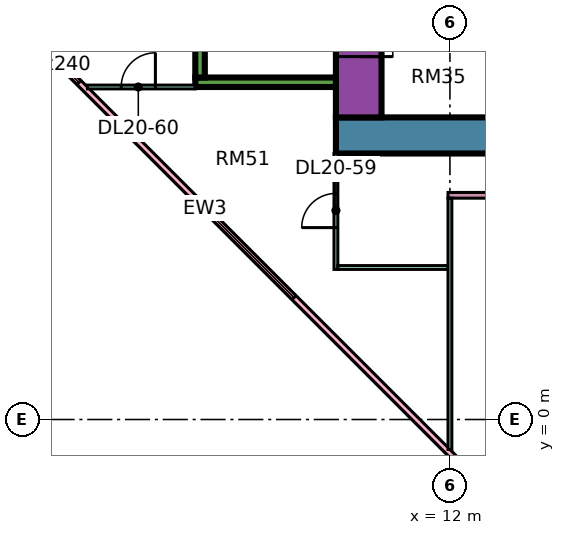
"""IFC4 building model, lengths in metres.
Left out: names, types, materials, properties, quantities, classifications, styles, units other than length and angle.
Written with IfcOpenShell. Run it as: python <this file> out.ifc"""

import sys

from ifc_helpers import new_model, si_unit, direction, frame, frame_2d, origin, place, context, subcontext, project, spatial, rectangle, extrude, element, fill, save


model = new_model("IFC4")
c1 = context("Model", 3, precision=1e-05, world=origin(), true_north=direction((0.0, 1.0)))
c2 = subcontext(c1, "Body", "Model", "MODEL_VIEW")
j1 = project(units=[si_unit("LENGTHUNIT", "METRE"), si_unit("PLANEANGLEUNIT", "RADIAN")], contexts=[c1])
p1 = place(None, origin())
s1 = spatial("IfcSite", under=j1, at=p1, CompositionType="ELEMENT")
p2 = place(p1, origin())
s2 = spatial("IfcBuilding", under=s1, at=p2, CompositionType="ELEMENT")
p3 = place(p2, frame((0.0, 0.0, 91.9)))
s3 = spatial("IfcBuildingStorey", under=s2, at=p3, CompositionType="ELEMENT", Elevation=91.9)
p4 = place(p3, frame((9.0, 7.475, 0.0), z_axis=(0.0, 0.0, 1.0), x_axis=(1.0, 0.0, 0.0)))
e1 = element("IfcWall", 1, at=p4, inside=s3, PredefinedType="SHEAR", context=c2, shape_type="SweptSolid", body=[
    extrude(rectangle(XDim=25.0, YDim=0.95, at=frame_2d((12.5, 0.0))), origin(), (0.0, 0.0, 1.0), 3.75),
])
p5 = place(p3, frame((9.6, 7.95, 0.0), z_axis=(0.0, 0.0, 1.0), x_axis=(0.0, 1.0, 0.0)))
e2 = element("IfcWall", 2, at=p5, inside=s3, PredefinedType="SHEAR", context=c2, shape_type="SweptSolid", body=[
    extrude(rectangle(XDim=11.1, YDim=1.2, at=frame_2d((5.55, 0.0))), origin(), (0.0, 0.0, 1.0), 3.75),
])
p6 = place(p5, frame((3.925, 0.0, 0.0)))
e3 = element("IfcOpeningElement", 3, at=p6, cuts=e2, PredefinedType="OPENING", context=c2, shape_type="SweptSolid", body=[
    extrude(rectangle(XDim=1.1, YDim=2.2, at=frame_2d((0.55, 1.1))), frame((0.0, 0.61, 0.0), z_axis=(0.0, -1.0, 0.0), x_axis=(1.0, 0.0, 0.0)), (0.0, 0.0, 1.0), 1.22),
])
p7 = place(p5, frame((6.425, 0.0, 0.0)))
e4 = element("IfcOpeningElement", 4, at=p7, cuts=e2, PredefinedType="OPENING", context=c2, shape_type="SweptSolid", body=[
    extrude(rectangle(XDim=1.1, YDim=2.2, at=frame_2d((0.55, 1.1))), frame((0.0, 0.61, 0.0), z_axis=(0.0, -1.0, 0.0), x_axis=(1.0, 0.0, 0.0)), (0.0, 0.0, 1.0), 1.22),
])
p8 = place(p5, frame((9.175, 0.0, 0.0)))
e5 = element("IfcOpeningElement", 5, at=p8, cuts=e2, PredefinedType="OPENING", context=c2, shape_type="SweptSolid", body=[
    extrude(rectangle(XDim=1.1, YDim=2.2, at=frame_2d((0.55, 1.1))), frame((0.0, 0.61, 0.0), z_axis=(0.0, -1.0, 0.0), x_axis=(1.0, 0.0, 0.0)), (0.0, 0.0, 1.0), 1.22),
])
p9 = place(p5, frame((1.6, 0.0, 0.0)))
e6 = element("IfcOpeningElement", 6, at=p9, cuts=e2, PredefinedType="OPENING", context=c2, shape_type="SweptSolid", body=[
    extrude(rectangle(XDim=0.9, YDim=2.1, at=frame_2d((0.45, 1.05))), frame((0.0, 0.61, 0.0), z_axis=(0.0, -1.0, 0.0), x_axis=(1.0, 0.0, 0.0)), (0.0, 0.0, 1.0), 1.22),
])
p10 = place(p3, frame((5.3, 8.875, 0.0), z_axis=(0.0, 0.0, 1.0), x_axis=(1.0, 0.0, 0.0)))
e7 = element("IfcWall", 7, at=p10, inside=s3, PredefinedType="SHEAR", context=c2, shape_type="SweptSolid", body=[
    extrude(rectangle(XDim=3.7, YDim=0.25, at=frame_2d((1.85, 0.0))), origin(), (0.0, 0.0, 1.0), 3.75),
])
p11 = place(p3, frame((5.425, 9.0, 0.0), z_axis=(0.0, 0.0, 1.0), x_axis=(0.0, 1.0, 0.0)))
e8 = element("IfcWall", 8, at=p11, inside=s3, PredefinedType="SHEAR", context=c2, shape_type="SweptSolid", body=[
    extrude(rectangle(XDim=4.0, YDim=0.25, at=frame_2d((2.0, 0.0))), origin(), (0.0, 0.0, 1.0), 3.75),
])
p12 = place(p3, frame((-1.447, 12.553, 0.0), z_axis=(0.0, 0.0, 1.0), x_axis=(0.707106781187, -0.707106781187, 0.0)))
e9 = element("IfcWall", 9, at=p12, inside=s3, PredefinedType="SOLIDWALL", context=c2, shape_type="SweptSolid", body=[
    extrude(rectangle(XDim=19.799, YDim=0.15, at=frame_2d((9.899, 0.0))), origin(), (0.0, 0.0, 1.0), 3.35),
])
p13 = place(p12, frame((2.212, 0.0, 0.45)))
e10 = element("IfcOpeningElement", 10, at=p13, cuts=e9, PredefinedType="OPENING", context=c2, shape_type="SweptSolid", body=[
    extrude(rectangle(XDim=3.0, YDim=2.4, at=frame_2d((1.5, 1.2))), frame((0.0, 0.085, 0.0), z_axis=(0.0, -1.0, 0.0), x_axis=(1.0, 0.0, 0.0)), (0.0, 0.0, 1.0), 0.17),
])
p14 = place(p12, frame((10.216, 0.0, 0.45)))
e11 = element("IfcOpeningElement", 11, at=p14, cuts=e9, PredefinedType="OPENING", context=c2, shape_type="SweptSolid", body=[
    extrude(rectangle(XDim=3.0, YDim=2.4, at=frame_2d((1.5, 1.2))), frame((0.0, 0.085, 0.0), z_axis=(0.0, -1.0, 0.0), x_axis=(1.0, 0.0, 0.0)), (0.0, 0.0, 1.0), 0.17),
])
p15 = place(p3, frame((2.461, 8.75, 0.0), z_axis=(0.0, 0.0, 1.0), x_axis=(1.0, 0.0, 0.0)))
e12 = element("IfcWall", 12, at=p15, inside=s3, PredefinedType="PARTITIONING", context=c2, shape_type="SweptSolid", body=[
    extrude(rectangle(XDim=2.839, YDim=0.1, at=frame_2d((1.419, 0.0))), origin(), (0.0, 0.0, 1.0), 3.35),
])
p16 = place(p15, frame((0.889, 0.0, 0.0)))
e13 = element("IfcOpeningElement", 13, at=p16, cuts=e12, PredefinedType="OPENING", context=c2, shape_type="SweptSolid", body=[
    extrude(rectangle(XDim=0.9, YDim=2.1, at=frame_2d((0.45, 1.05))), frame((0.0, 0.06, 0.0), z_axis=(0.0, -1.0, 0.0), x_axis=(1.0, 0.0, 0.0)), (0.0, 0.0, 1.0), 0.12),
])
p17 = place(p3, frame((9.0, 3.95, 0.0), z_axis=(0.0, 0.0, 1.0), x_axis=(0.0, 1.0, 0.0)))
e14 = element("IfcWall", 14, at=p17, inside=s3, PredefinedType="PARTITIONING", context=c2, shape_type="SweptSolid", body=[
    extrude(rectangle(XDim=3.05, YDim=0.1, at=frame_2d((1.525, 0.0))), origin(), (0.0, 0.0, 1.0), 3.35),
])
p18 = place(p17, frame((1.1, 0.0, 0.0)))
e15 = element("IfcOpeningElement", 15, at=p18, cuts=e14, PredefinedType="OPENING", context=c2, shape_type="SweptSolid", body=[
    extrude(rectangle(XDim=0.9, YDim=2.1, at=frame_2d((0.45, 1.05))), frame((0.0, 0.06, 0.0), z_axis=(0.0, -1.0, 0.0), x_axis=(1.0, 0.0, 0.0)), (0.0, 0.0, 1.0), 0.12),
])
p19 = place(p3, frame((9.05, 4.0, 0.0), z_axis=(0.0, 0.0, 1.0), x_axis=(1.0, 0.0, 0.0)))
e16 = element("IfcWall", 16, at=p19, inside=s3, PredefinedType="PARTITIONING", context=c2, shape_type="SweptSolid", body=[
    extrude(rectangle(XDim=2.9, YDim=0.1, at=frame_2d((1.45, 0.0))), origin(), (0.0, 0.0, 1.0), 3.35),
])
p20 = place(p3, frame((11.95, 5.9, 0.0), z_axis=(0.0, 0.0, 1.0), x_axis=(1.0, 0.0, 0.0)))
e17 = element("IfcWall", 17, at=p20, inside=s3, PredefinedType="PARTITIONING", context=c2, shape_type="SweptSolid", body=[
    extrude(rectangle(XDim=21.1, YDim=0.15, at=frame_2d((10.55, 0.0))), origin(), (0.0, 0.0, 1.0), 3.35),
])
p21 = place(p20, frame((10.1, 0.0, 0.0)))
e18 = element("IfcOpeningElement", 18, at=p21, cuts=e17, PredefinedType="OPENING", context=c2, shape_type="SweptSolid", body=[
    extrude(rectangle(XDim=0.9, YDim=2.1, at=frame_2d((0.45, 1.05))), frame((0.0, 0.085, 0.0), z_axis=(0.0, -1.0, 0.0), x_axis=(1.0, 0.0, 0.0)), (0.0, 0.0, 1.0), 0.17),
])
p22 = place(p20, frame((16.1, 0.0, 0.0)))
e19 = element("IfcOpeningElement", 19, at=p22, cuts=e17, PredefinedType="OPENING", context=c2, shape_type="SweptSolid", body=[
    extrude(rectangle(XDim=0.9, YDim=2.1, at=frame_2d((0.45, 1.05))), frame((0.0, 0.085, 0.0), z_axis=(0.0, -1.0, 0.0), x_axis=(1.0, 0.0, 0.0)), (0.0, 0.0, 1.0), 0.17),
])
p23 = place(p20, frame((4.1, 0.0, 0.0)))
e20 = element("IfcOpeningElement", 20, at=p23, cuts=e17, PredefinedType="OPENING", context=c2, shape_type="SweptSolid", body=[
    extrude(rectangle(XDim=0.9, YDim=2.1, at=frame_2d((0.45, 1.05))), frame((0.0, 0.085, 0.0), z_axis=(0.0, -1.0, 0.0), x_axis=(1.0, 0.0, 0.0)), (0.0, 0.0, 1.0), 0.17),
])
p24 = place(p3, frame((12.0, -0.788, 0.0), z_axis=(0.0, 0.0, 1.0), x_axis=(0.0, 1.0, 0.0)))
e21 = element("IfcWall", 21, at=p24, inside=s3, PredefinedType="PARTITIONING", context=c2, shape_type="SweptSolid", body=[
    extrude(rectangle(XDim=6.613, YDim=0.1, at=frame_2d((3.306, 0.0))), origin(), (0.0, 0.0, 1.0), 3.35),
])
p25 = place(p13, origin())
e22 = element("IfcWindow", 22, at=p25, inside=s3, PartitioningType="SINGLE_PANEL", PredefinedType="WINDOW", context=c2, shape_type="SweptSolid", body=[
    extrude(rectangle(XDim=3.0, YDim=2.4, at=frame_2d((1.5, 1.2))), frame((0.0, 0.03, 0.0), z_axis=(0.0, -1.0, 0.0), x_axis=(1.0, 0.0, 0.0)), (0.0, 0.0, 1.0), 0.06),
])
fill(e10, e22)
p26 = place(p14, origin())
e23 = element("IfcWindow", 23, at=p26, inside=s3, PartitioningType="SINGLE_PANEL", PredefinedType="WINDOW", context=c2, shape_type="SweptSolid", body=[
    extrude(rectangle(XDim=3.0, YDim=2.4, at=frame_2d((1.5, 1.2))), frame((0.0, 0.03, 0.0), z_axis=(0.0, -1.0, 0.0), x_axis=(1.0, 0.0, 0.0)), (0.0, 0.0, 1.0), 0.06),
])
fill(e11, e23)
p27 = place(p9, frame((0.9, 0.0, 0.0), z_axis=(0.0, 0.0, 1.0), x_axis=(-1.0, 0.0, 0.0)))
e24 = element("IfcDoor", 24, at=p27, inside=s3, OperationType="SINGLE_SWING_LEFT", PredefinedType="DOOR", context=c2, shape_type="SweptSolid", body=[
    extrude(rectangle(XDim=0.9, YDim=2.1, at=frame_2d((0.45, 1.05))), frame((0.0, 0.025, 0.0), z_axis=(0.0, -1.0, 0.0), x_axis=(1.0, 0.0, 0.0)), (0.0, 0.0, 1.0), 0.05),
])
fill(e6, e24)
p28 = place(p18, origin())
e25 = element("IfcDoor", 25, at=p28, inside=s3, OperationType="SINGLE_SWING_LEFT", PredefinedType="DOOR", context=c2, shape_type="SweptSolid", body=[
    extrude(rectangle(XDim=0.9, YDim=2.1, at=frame_2d((0.45, 1.05))), frame((0.0, 0.025, 0.0), z_axis=(0.0, -1.0, 0.0), x_axis=(1.0, 0.0, 0.0)), (0.0, 0.0, 1.0), 0.05),
])
fill(e15, e25)
p29 = place(p16, frame((0.9, 0.0, 0.0), z_axis=(0.0, 0.0, 1.0), x_axis=(-1.0, 0.0, 0.0)))
e26 = element("IfcDoor", 26, at=p29, inside=s3, OperationType="SINGLE_SWING_RIGHT", PredefinedType="DOOR", context=c2, shape_type="SweptSolid", body=[
    extrude(rectangle(XDim=0.9, YDim=2.1, at=frame_2d((0.45, 1.05))), frame((0.0, 0.025, 0.0), z_axis=(0.0, -1.0, 0.0), x_axis=(1.0, 0.0, 0.0)), (0.0, 0.0, 1.0), 0.05),
])
fill(e13, e26)
save(model, sys.argv[1])
